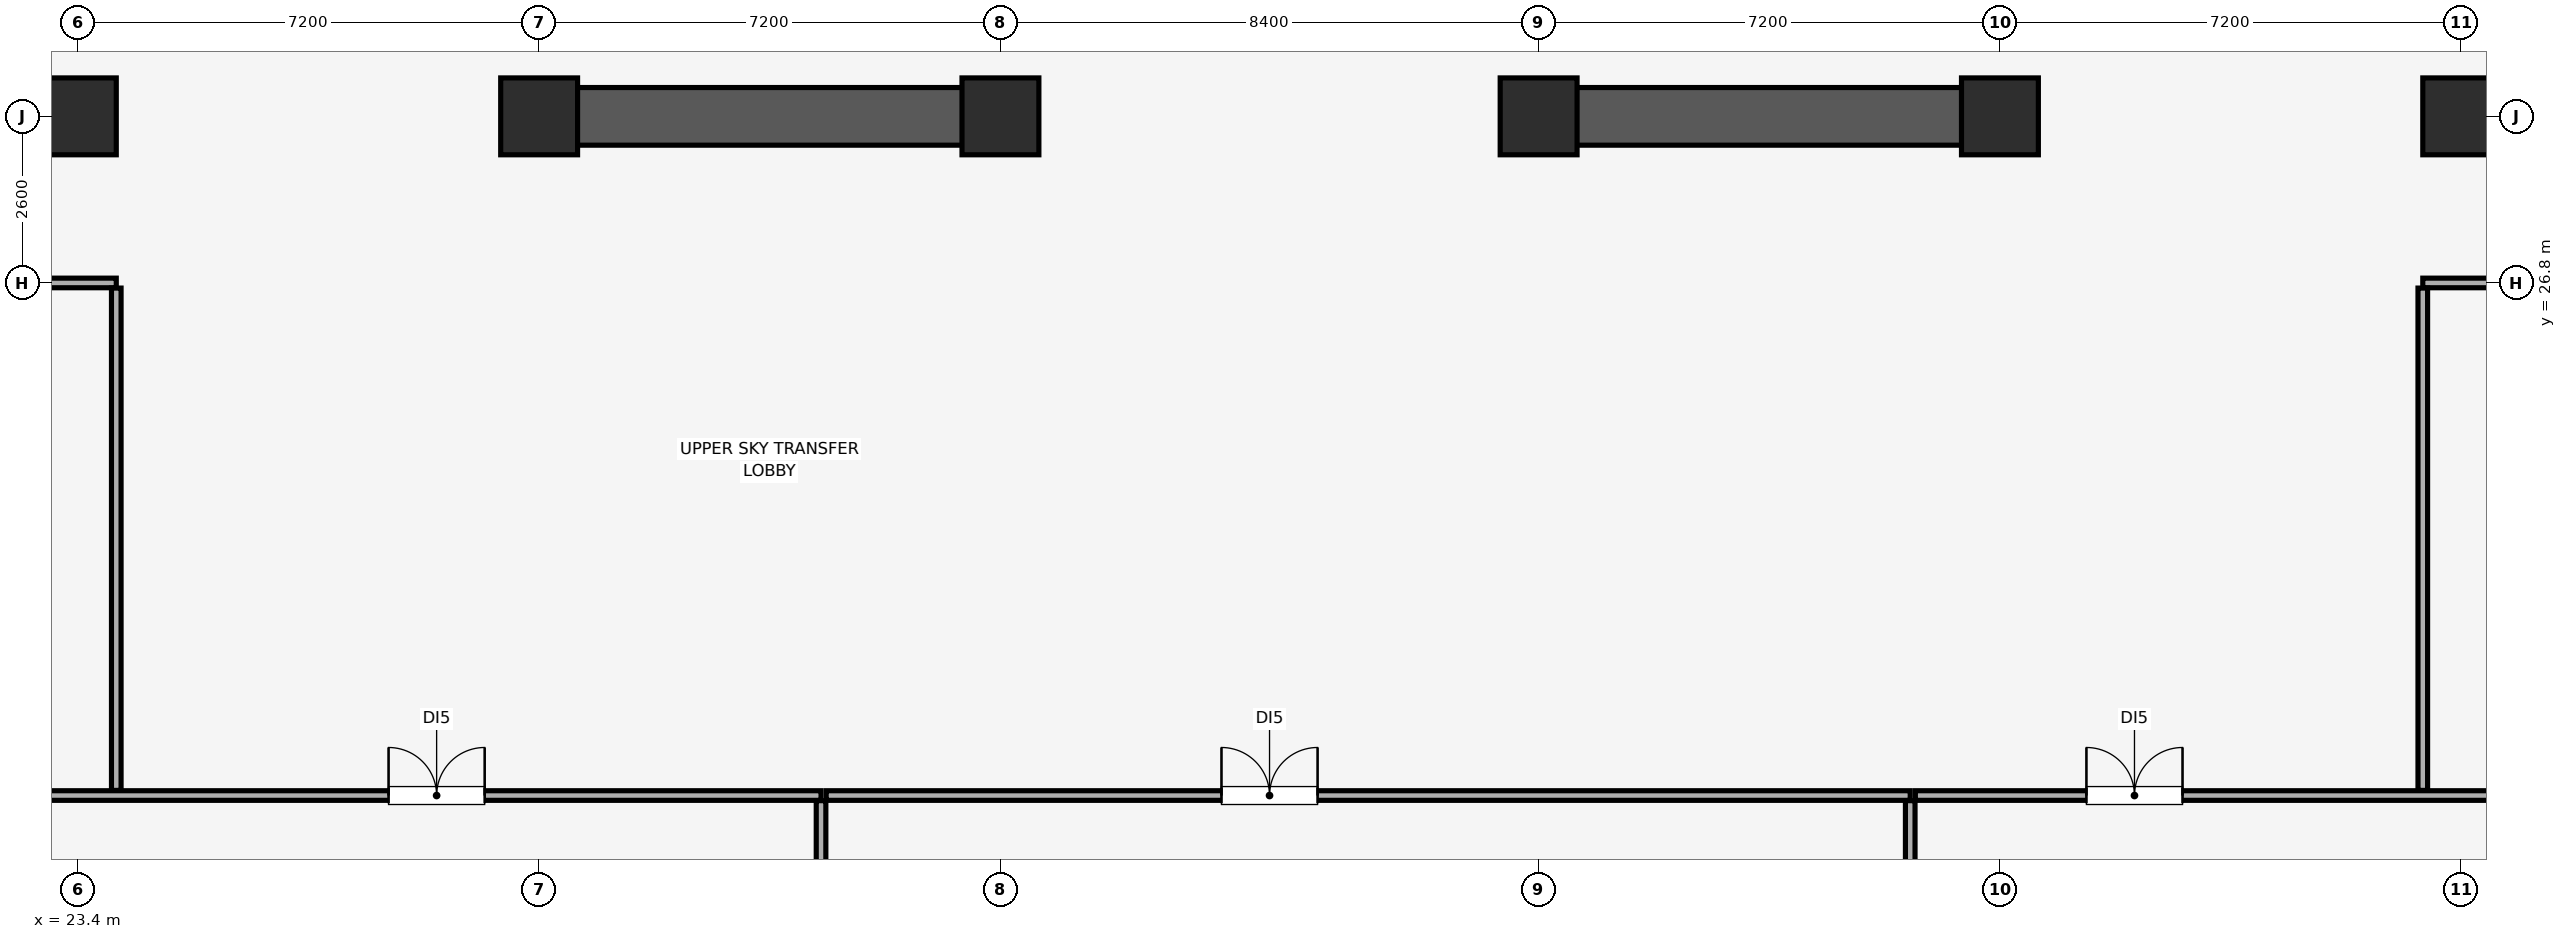
"""IFC4 building model, lengths in metres.
Left out: names, types, materials, properties, quantities, classifications, styles, units other than length and angle.
Written with IfcOpenShell. Run it as: python <this file> out.ifc"""

import sys

from ifc_helpers import new_model, si_unit, direction, frame, frame_2d, origin, origin_2d, place, context, subcontext, project, spatial, rectangle, extrude, element, fill, save


model = new_model("IFC4")
c1 = context("Model", 3, precision=1e-05, world=origin(), true_north=direction((0.0, 1.0)))
c2 = subcontext(c1, "Body", "Model", "MODEL_VIEW")
j1 = project(units=[si_unit("LENGTHUNIT", "METRE"), si_unit("PLANEANGLEUNIT", "RADIAN")], contexts=[c1])
p1 = place(None, origin())
s1 = spatial("IfcSite", under=j1, at=p1, CompositionType="ELEMENT")
p2 = place(p1, origin())
s2 = spatial("IfcBuilding", under=s1, at=p2, CompositionType="ELEMENT")
p3 = place(p2, frame((0.0, 0.0, 224.35)))
s3 = spatial("IfcBuildingStorey", under=s2, at=p3, CompositionType="ELEMENT", Elevation=224.35)
for number, where, z_axis, x_axis in (
    (1, (23.4, 29.4, 0.0), (0.0, 0.0, 1.0), (1.0, 0.0, 0.0)),
    (2, (30.6, 29.4, 0.0), (0.0, 0.0, 1.0), (1.0, 0.0, 0.0)),
    (3, (37.8, 29.4, 0.0), (0.0, 0.0, 1.0), (1.0, 0.0, 0.0)),
    (4, (46.2, 29.4, 0.0), (0.0, 0.0, 1.0), (1.0, 0.0, 0.0)),
    (5, (53.4, 29.4, 0.0), (0.0, 0.0, 1.0), (1.0, 0.0, 0.0)),
    (6, (60.6, 29.4, 0.0), (0.0, 0.0, 1.0), (1.0, 0.0, 0.0)),
):
    element("IfcColumn", number, at=place(p3, frame(where, z_axis=z_axis, x_axis=x_axis)), inside=s3, PredefinedType="COLUMN", context=c2, shape_type="SweptSolid", body=[
        extrude(rectangle(XDim=1.2, YDim=1.2, at=origin_2d()), origin(), (0.0, 0.0, 1.0), 4.56),
    ])
p4 = place(p3, frame((16.655, 29.4, 0.0), z_axis=(0.0, 0.0, 1.0), x_axis=(1.0, 0.0, 0.0)))
e7 = element("IfcWall", 7, at=p4, inside=s3, PredefinedType="SHEAR", context=c2, shape_type="SweptSolid", body=[
    extrude(rectangle(XDim=6.945, YDim=0.9, at=frame_2d((3.473, 0.0))), origin(), (0.0, 0.0, 1.0), 4.52),
])
for number, where, z_axis, x_axis in (
    (8, (30.4, 29.4, 0.0), (0.0, 0.0, 1.0), (1.0, 0.0, 0.0)),
    (9, (46.0, 29.4, 0.0), (0.0, 0.0, 1.0), (1.0, 0.0, 0.0)),
):
    element("IfcWall", number, at=place(p3, frame(where, z_axis=z_axis, x_axis=x_axis)), inside=s3, PredefinedType="SHEAR", context=c2, shape_type="SweptSolid", body=[
        extrude(rectangle(XDim=7.6, YDim=0.9, at=frame_2d((3.8, 0.0))), origin(), (0.0, 0.0, 1.0), 4.52),
    ])
p5 = place(p3, frame((60.4, 29.4, 0.0), z_axis=(0.0, 0.0, 1.0), x_axis=(1.0, 0.0, 0.0)))
e10 = element("IfcWall", 10, at=p5, inside=s3, PredefinedType="SHEAR", context=c2, shape_type="SweptSolid", body=[
    extrude(rectangle(XDim=6.945, YDim=0.9, at=frame_2d((3.473, 0.0))), origin(), (0.0, 0.0, 1.0), 4.52),
])
p6 = place(p3, frame((3.15, 18.8, 0.0), z_axis=(0.0, 0.0, 1.0), x_axis=(1.0, 0.0, 0.0)))
e11 = element("IfcWall", 11, at=p6, inside=s3, PredefinedType="PARTITIONING", context=c2, shape_type="SweptSolid", body=[
    extrude(rectangle(XDim=31.85, YDim=0.15, at=frame_2d((15.925, 0.0))), origin(), (0.0, 0.0, 1.0), 4.52),
])
p7 = place(p6, frame((25.1, 0.0, 0.0)))
e12 = element("IfcOpeningElement", 12, at=p7, cuts=e11, PredefinedType="OPENING", context=c2, shape_type="SweptSolid", body=[
    extrude(rectangle(XDim=1.5, YDim=2.25, at=frame_2d((0.75, 1.125))), frame((0.0, 0.085, 0.0), z_axis=(0.0, -1.0, 0.0), x_axis=(1.0, 0.0, 0.0)), (0.0, 0.0, 1.0), 0.17),
])
p8 = place(p3, frame((35.0, 3.15, 0.0), z_axis=(0.0, 0.0, 1.0), x_axis=(0.0, 1.0, 0.0)))
e13 = element("IfcWall", 13, at=p8, inside=s3, PredefinedType="PARTITIONING", context=c2, shape_type="SweptSolid", body=[
    extrude(rectangle(XDim=15.57, YDim=0.15, at=frame_2d((7.785, 0.0))), origin(), (0.0, 0.0, 1.0), 4.52),
])
p9 = place(p3, frame((35.08, 18.8, 0.0), z_axis=(0.0, 0.0, 1.0), x_axis=(1.0, 0.0, 0.0)))
e14 = element("IfcWall", 14, at=p9, inside=s3, PredefinedType="PARTITIONING", context=c2, shape_type="SweptSolid", body=[
    extrude(rectangle(XDim=16.92, YDim=0.15, at=frame_2d((8.46, 0.0))), origin(), (0.0, 0.0, 1.0), 4.52),
])
p10 = place(p9, frame((6.17, 0.0, 0.0)))
e15 = element("IfcOpeningElement", 15, at=p10, cuts=e14, PredefinedType="OPENING", context=c2, shape_type="SweptSolid", body=[
    extrude(rectangle(XDim=1.5, YDim=2.25, at=frame_2d((0.75, 1.125))), frame((0.0, 0.085, 0.0), z_axis=(0.0, -1.0, 0.0), x_axis=(1.0, 0.0, 0.0)), (0.0, 0.0, 1.0), 0.17),
])
p11 = place(p3, frame((52.0, 3.15, 0.0), z_axis=(0.0, 0.0, 1.0), x_axis=(0.0, 1.0, 0.0)))
e16 = element("IfcWall", 16, at=p11, inside=s3, PredefinedType="PARTITIONING", context=c2, shape_type="SweptSolid", body=[
    extrude(rectangle(XDim=15.57, YDim=0.15, at=frame_2d((7.785, 0.0))), origin(), (0.0, 0.0, 1.0), 4.52),
])
p12 = place(p3, frame((52.08, 18.8, 0.0), z_axis=(0.0, 0.0, 1.0), x_axis=(1.0, 0.0, 0.0)))
e17 = element("IfcWall", 17, at=p12, inside=s3, PredefinedType="PARTITIONING", context=c2, shape_type="SweptSolid", body=[
    extrude(rectangle(XDim=28.77, YDim=0.15, at=frame_2d((14.385, 0.0))), origin(), (0.0, 0.0, 1.0), 4.52),
])
p13 = place(p12, frame((2.67, 0.0, 0.0)))
e18 = element("IfcOpeningElement", 18, at=p13, cuts=e17, PredefinedType="OPENING", context=c2, shape_type="SweptSolid", body=[
    extrude(rectangle(XDim=1.5, YDim=2.25, at=frame_2d((0.75, 1.125))), frame((0.0, 0.085, 0.0), z_axis=(0.0, -1.0, 0.0), x_axis=(1.0, 0.0, 0.0)), (0.0, 0.0, 1.0), 0.17),
])
p14 = place(p3, frame((3.15, 26.8, 0.0), z_axis=(0.0, 0.0, 1.0), x_axis=(1.0, 0.0, 0.0)))
e19 = element("IfcWall", 19, at=p14, inside=s3, PredefinedType="PARTITIONING", context=c2, shape_type="SweptSolid", body=[
    extrude(rectangle(XDim=20.85, YDim=0.15, at=frame_2d((10.425, 0.0))), origin(), (0.0, 0.0, 1.0), 4.52),
])
p15 = place(p14, frame((15.35, 0.0, 0.0)))
e20 = element("IfcOpeningElement", 20, at=p15, cuts=e19, PredefinedType="OPENING", context=c2, shape_type="SweptSolid", body=[
    extrude(rectangle(XDim=1.0, YDim=2.15, at=frame_2d((0.5, 1.075))), frame((0.0, 0.085, 0.0), z_axis=(0.0, -1.0, 0.0), x_axis=(1.0, 0.0, 0.0)), (0.0, 0.0, 1.0), 0.17),
])
p16 = place(p3, frame((24.0, 18.88, 0.0), z_axis=(0.0, 0.0, 1.0), x_axis=(0.0, 1.0, 0.0)))
e21 = element("IfcWall", 21, at=p16, inside=s3, PredefinedType="PARTITIONING", context=c2, shape_type="SweptSolid", body=[
    extrude(rectangle(XDim=7.84, YDim=0.15, at=frame_2d((3.92, 0.0))), origin(), (0.0, 0.0, 1.0), 4.52),
])
p17 = place(p3, frame((60.0, 26.8, 0.0), z_axis=(0.0, 0.0, 1.0), x_axis=(1.0, 0.0, 0.0)))
e22 = element("IfcWall", 22, at=p17, inside=s3, PredefinedType="PARTITIONING", context=c2, shape_type="SweptSolid", body=[
    extrude(rectangle(XDim=20.85, YDim=0.15, at=frame_2d((10.425, 0.0))), origin(), (0.0, 0.0, 1.0), 4.52),
])
p18 = place(p17, frame((4.5, 0.0, 0.0)))
e23 = element("IfcOpeningElement", 23, at=p18, cuts=e22, PredefinedType="OPENING", context=c2, shape_type="SweptSolid", body=[
    extrude(rectangle(XDim=1.0, YDim=2.15, at=frame_2d((0.5, 1.075))), frame((0.0, 0.085, 0.0), z_axis=(0.0, -1.0, 0.0), x_axis=(1.0, 0.0, 0.0)), (0.0, 0.0, 1.0), 0.17),
])
p19 = place(p3, frame((60.0, 18.88, 0.0), z_axis=(0.0, 0.0, 1.0), x_axis=(0.0, 1.0, 0.0)))
e24 = element("IfcWall", 24, at=p19, inside=s3, PredefinedType="PARTITIONING", context=c2, shape_type="SweptSolid", body=[
    extrude(rectangle(XDim=7.84, YDim=0.15, at=frame_2d((3.92, 0.0))), origin(), (0.0, 0.0, 1.0), 4.52),
])
p20 = place(p7, origin())
e25 = element("IfcDoor", 25, at=p20, inside=s3, OperationType="DOUBLE_DOOR_SINGLE_SWING", PredefinedType="DOOR", context=c2, shape_type="SweptSolid", body=[
    extrude(rectangle(XDim=1.5, YDim=2.25, at=frame_2d((0.75, 1.125))), frame((0.0, 0.025, 0.0), z_axis=(0.0, -1.0, 0.0), x_axis=(1.0, 0.0, 0.0)), (0.0, 0.0, 1.0), 0.05),
])
fill(e12, e25)
p21 = place(p10, origin())
e26 = element("IfcDoor", 26, at=p21, inside=s3, OperationType="DOUBLE_DOOR_SINGLE_SWING", PredefinedType="DOOR", context=c2, shape_type="SweptSolid", body=[
    extrude(rectangle(XDim=1.5, YDim=2.25, at=frame_2d((0.75, 1.125))), frame((0.0, 0.025, 0.0), z_axis=(0.0, -1.0, 0.0), x_axis=(1.0, 0.0, 0.0)), (0.0, 0.0, 1.0), 0.05),
])
fill(e15, e26)
p22 = place(p13, origin())
e27 = element("IfcDoor", 27, at=p22, inside=s3, OperationType="DOUBLE_DOOR_SINGLE_SWING", PredefinedType="DOOR", context=c2, shape_type="SweptSolid", body=[
    extrude(rectangle(XDim=1.5, YDim=2.25, at=frame_2d((0.75, 1.125))), frame((0.0, 0.025, 0.0), z_axis=(0.0, -1.0, 0.0), x_axis=(1.0, 0.0, 0.0)), (0.0, 0.0, 1.0), 0.05),
])
fill(e18, e27)
save(model, sys.argv[1])
